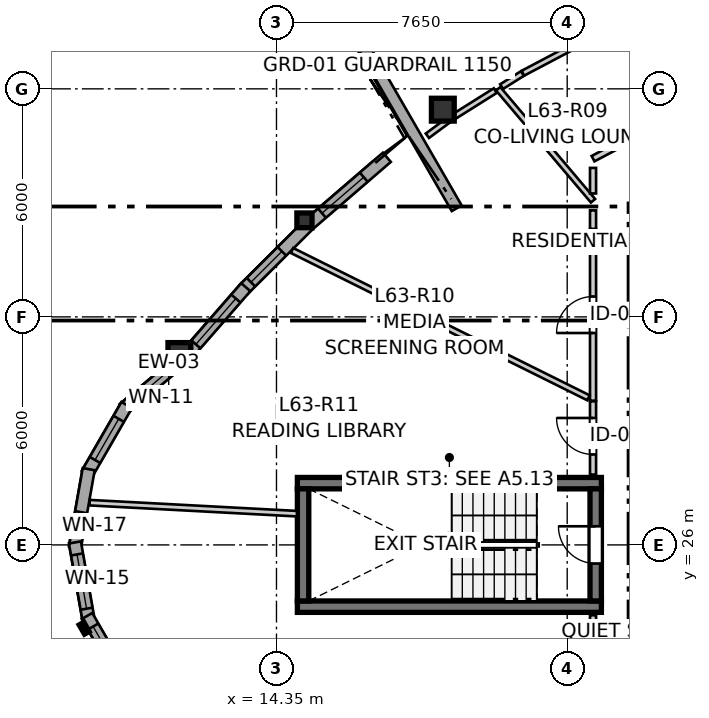
"""IFC4 building model, lengths in metres.
Left out: names, types, materials, properties, quantities, classifications, styles, units other than length and angle.
Written with IfcOpenShell. Run it as: python <this file> out.ifc"""

import sys

from ifc_helpers import new_model, si_unit, direction, frame, frame_2d, origin, origin_2d, place, context, subcontext, project, spatial, rectangle, i_section, extrude, source, transform, mapped, element, fill, save


model = new_model("IFC4")
c1 = context("Model", 3, precision=1e-05, world=origin(), true_north=direction((0.0, 1.0)))
c2 = subcontext(c1, "Body", "Model", "MODEL_VIEW")
j1 = project(units=[si_unit("LENGTHUNIT", "METRE"), si_unit("PLANEANGLEUNIT", "RADIAN")], contexts=[c1])
p1 = place(None, origin())
s1 = spatial("IfcSite", under=j1, at=p1, CompositionType="ELEMENT")
p2 = place(p1, origin())
s2 = spatial("IfcBuilding", under=s1, at=p2, CompositionType="ELEMENT")
p3 = place(p2, frame((0.0, 0.0, 211.6)))
s3 = spatial("IfcBuildingStorey", under=s2, at=p3, CompositionType="ELEMENT", Elevation=211.6)
for number, where, z_axis, x_axis in (
    (1, (14.9, 24.375, 0.0), (0.0, 0.0, 1.0), (1.0, 0.0, 0.0)),
    (2, (22.9, 27.625, 0.0), (0.0, 0.0, 1.0), (-1.0, 0.0, 0.0)),
):
    element("IfcWall", number, at=place(p3, frame(where, z_axis=z_axis, x_axis=x_axis)), inside=s3, PredefinedType="SHEAR", context=c2, shape_type="SweptSolid", body=[
        extrude(rectangle(XDim=8.0, YDim=0.3, at=frame_2d((4.0, 0.0))), origin(), (0.0, 0.0, 1.0), 2.96),
    ])
p4 = place(p3, frame((15.05, 27.475, 0.0), z_axis=(0.0, 0.0, 1.0), x_axis=(0.0, -1.0, 0.0)))
e3 = element("IfcWall", 3, at=p4, inside=s3, PredefinedType="SHEAR", context=c2, shape_type="SweptSolid", body=[
    extrude(rectangle(XDim=2.95, YDim=0.3, at=frame_2d((1.475, 0.0))), origin(), (0.0, 0.0, 1.0), 2.96),
])
p5 = place(p3, frame((22.75, 24.525, 0.0), z_axis=(0.0, 0.0, 1.0), x_axis=(0.0, 1.0, 0.0)))
e4 = element("IfcWall", 4, at=p5, inside=s3, PredefinedType="SHEAR", context=c2, shape_type="SweptSolid", body=[
    extrude(rectangle(XDim=2.95, YDim=0.3, at=frame_2d((1.475, 0.0))), origin(), (0.0, 0.0, 1.0), 2.96),
])
p6 = place(p5, frame((0.985, 0.0, 0.0)))
e5 = element("IfcOpeningElement", 5, at=p6, cuts=e4, PredefinedType="OPENING", context=c2, shape_type="SweptSolid", body=[
    extrude(rectangle(XDim=0.98, YDim=2.15, at=frame_2d((0.49, 1.075))), frame((0.0, 0.16, 0.0), z_axis=(0.0, -1.0, 0.0), x_axis=(1.0, 0.0, 0.0)), (0.0, 0.0, 1.0), 0.32),
])
m1 = source(origin(), c2, "Body", "SweptSolid", [
    extrude(rectangle(XDim=0.6, YDim=0.6, at=origin_2d()), origin(), (0.0, 0.0, 1.0), 2.96),
])
for number, where, z_axis, x_axis in (
    (6, (11.795, 31.023, 0.0), (0.0, 0.0, 1.0), (1.0, 0.0, 0.0)),
    (7, (18.727, 37.452, 0.0), (0.0, 0.0, 1.0), (1.0, 0.0, 0.0)),
):
    element("IfcColumn", number, at=place(p3, frame(where, z_axis=z_axis, x_axis=x_axis)), inside=s3, PredefinedType="COLUMN", context=c2, shape_type="MappedRepresentation", body=[
        mapped(m1, transform((0.0, 0.0, 0.0), x_axis=(1.0, 0.0, 0.0), y_axis=(0.0, 1.0, 0.0), z_axis=(0.0, 0.0, 1.0), scale=1.0)),
    ])
m2 = source(origin(), c2, "Body", "SweptSolid", [
    extrude(i_section(OverallWidth=0.398, OverallDepth=0.387, WebThickness=0.019, FlangeThickness=0.03, FilletRadius=0.015, at=origin_2d()), origin(), (0.0, 0.0, 1.0), 2.96),
])
p7 = place(p3, frame((15.086, 34.541, 0.0), z_axis=(0.0, 0.0, 1.0), x_axis=(1.0, 0.0, 0.0)))
e8 = element("IfcColumn", 8, at=p7, inside=s3, PredefinedType="PILASTER", context=c2, shape_type="MappedRepresentation", body=[
    mapped(m2, transform((0.0, 0.0, 0.0), x_axis=(1.0, 0.0, 0.0), y_axis=(0.0, 1.0, 0.0), z_axis=(0.0, 0.0, 1.0), scale=1.0)),
])
p8 = place(p3, frame((11.829, 30.843, 0.0), z_axis=(0.0, 0.0, 1.0), x_axis=(-0.76606505432, -0.642763045414, 0.0)))
e9 = element("IfcWall", 9, at=p8, inside=s3, PredefinedType="SOLIDWALL", context=c2, shape_type="SweptSolid", body=[
    extrude(rectangle(XDim=1.962, YDim=0.32, at=frame_2d((0.981, 0.0))), origin(), (0.0, 0.0, 1.0), 2.58),
])
p9 = place(p8, frame((0.391, 0.0, 0.82)))
e10 = element("IfcOpeningElement", 10, at=p9, cuts=e9, PredefinedType="OPENING", context=c2, shape_type="SweptSolid", body=[
    extrude(rectangle(XDim=1.25, YDim=1.35, at=frame_2d((0.625, 0.675))), frame((0.0, 0.17, 0.0), z_axis=(0.0, -1.0, 0.0), x_axis=(1.0, 0.0, 0.0)), (0.0, 0.0, 1.0), 0.34),
])
p10 = place(p3, frame((10.409, 29.681, 0.0), z_axis=(0.0, 0.0, 1.0), x_axis=(-0.49990781971, -0.866078617559, 0.0)))
e11 = element("IfcWall", 11, at=p10, inside=s3, PredefinedType="SOLIDWALL", context=c2, shape_type="SweptSolid", body=[
    extrude(rectangle(XDim=2.09, YDim=0.32, at=frame_2d((1.045, 0.0))), origin(), (0.0, 0.0, 1.0), 2.58),
])
p11 = place(p10, frame((0.42, 0.0, 0.82)))
e12 = element("IfcOpeningElement", 12, at=p11, cuts=e11, PredefinedType="OPENING", context=c2, shape_type="SweptSolid", body=[
    extrude(rectangle(XDim=1.25, YDim=1.35, at=frame_2d((0.625, 0.675))), frame((0.0, 0.17, 0.0), z_axis=(0.0, -1.0, 0.0), x_axis=(1.0, 0.0, 0.0)), (0.0, 0.0, 1.0), 0.34),
])
p12 = place(p3, frame((9.409, 27.993, 0.0), z_axis=(0.0, 0.0, 1.0), x_axis=(-0.173672066494, -0.984803540469, 0.0)))
e13 = element("IfcWall", 13, at=p12, inside=s3, PredefinedType="SOLIDWALL", context=c2, shape_type="SweptSolid", body=[
    extrude(rectangle(XDim=2.09, YDim=0.32, at=frame_2d((1.045, 0.0))), origin(), (0.0, 0.0, 1.0), 2.58),
])
p13 = place(p12, frame((1.149, 0.0, 0.82)))
e14 = element("IfcOpeningElement", 14, at=p13, cuts=e13, PredefinedType="OPENING", context=c2, shape_type="SweptSolid", body=[
    extrude(rectangle(XDim=0.58, YDim=1.35, at=frame_2d((0.29, 0.675))), frame((0.0, 0.17, 0.0), z_axis=(0.0, -1.0, 0.0), x_axis=(1.0, 0.0, 0.0)), (0.0, 0.0, 1.0), 0.34),
])
p14 = place(p3, frame((9.046, 26.065, 0.0), z_axis=(0.0, 0.0, 1.0), x_axis=(0.173672066494, -0.984803540469, 0.0)))
e15 = element("IfcWall", 15, at=p14, inside=s3, PredefinedType="SOLIDWALL", context=c2, shape_type="SweptSolid", body=[
    extrude(rectangle(XDim=2.09, YDim=0.32, at=frame_2d((1.045, 0.0))), origin(), (0.0, 0.0, 1.0), 2.58),
])
p15 = place(p14, frame((0.32, 0.0, 0.82)))
e16 = element("IfcOpeningElement", 16, at=p15, cuts=e15, PredefinedType="OPENING", context=c2, shape_type="SweptSolid", body=[
    extrude(rectangle(XDim=1.45, YDim=1.25, at=frame_2d((0.725, 0.625))), frame((0.0, 0.17, 0.0), z_axis=(0.0, -1.0, 0.0), x_axis=(1.0, 0.0, 0.0)), (0.0, 0.0, 1.0), 0.34),
])
p16 = place(p3, frame((9.365, 24.129, 0.0), z_axis=(0.0, 0.0, 1.0), x_axis=(0.49990781971, -0.866078617559, 0.0)))
e17 = element("IfcWall", 17, at=p16, inside=s3, PredefinedType="SOLIDWALL", context=c2, shape_type="SweptSolid", body=[
    extrude(rectangle(XDim=2.09, YDim=0.32, at=frame_2d((1.045, 0.0))), origin(), (0.0, 0.0, 1.0), 2.58),
])
p17 = place(p16, frame((0.32, 0.0, 0.82)))
e18 = element("IfcOpeningElement", 18, at=p17, cuts=e17, PredefinedType="OPENING", context=c2, shape_type="SweptSolid", body=[
    extrude(rectangle(XDim=1.45, YDim=1.25, at=frame_2d((0.725, 0.625))), frame((0.0, 0.17, 0.0), z_axis=(0.0, -1.0, 0.0), x_axis=(1.0, 0.0, 0.0)), (0.0, 0.0, 1.0), 0.34),
])
p18 = place(p3, frame((17.255, 36.199, 0.0), z_axis=(0.0, 0.0, 1.0), x_axis=(-0.757502279287, -0.652832518242, 0.0)))
e19 = element("IfcWall", 19, at=p18, inside=s3, PredefinedType="SOLIDWALL", context=c2, shape_type="SweptSolid", body=[
    extrude(rectangle(XDim=2.706, YDim=0.32, at=frame_2d((1.353, 0.0))), origin(), (0.0, 0.0, 1.0), 2.58),
])
p19 = place(p18, frame((0.803, 0.0, 0.82)))
e20 = element("IfcOpeningElement", 20, at=p19, cuts=e19, PredefinedType="OPENING", context=c2, shape_type="SweptSolid", body=[
    extrude(rectangle(XDim=1.45, YDim=1.25, at=frame_2d((0.725, 0.625))), frame((0.0, 0.17, 0.0), z_axis=(0.0, -1.0, 0.0), x_axis=(1.0, 0.0, 0.0)), (0.0, 0.0, 1.0), 0.34),
])
p20 = place(p3, frame((15.185, 34.413, 0.0), z_axis=(0.0, 0.0, 1.0), x_axis=(-0.70842648029, -0.705784614471, 0.0)))
e21 = element("IfcWall", 21, at=p20, inside=s3, PredefinedType="SOLIDWALL", context=c2, shape_type="SweptSolid", body=[
    extrude(rectangle(XDim=2.403, YDim=0.32, at=frame_2d((1.201, 0.0))), origin(), (0.0, 0.0, 1.0), 2.58),
])
p21 = place(p20, frame((0.976, 0.0, 0.82)))
e22 = element("IfcOpeningElement", 22, at=p21, cuts=e21, PredefinedType="OPENING", context=c2, shape_type="SweptSolid", body=[
    extrude(rectangle(XDim=1.15, YDim=1.2, at=frame_2d((0.575, 0.6))), frame((0.0, 0.17, 0.0), z_axis=(0.0, -1.0, 0.0), x_axis=(1.0, 0.0, 0.0)), (0.0, 0.0, 1.0), 0.34),
])
p22 = place(p3, frame((13.542, 32.781, 0.0), z_axis=(0.0, 0.0, 1.0), x_axis=(-0.657706548736, -0.753274250024, 0.0)))
e23 = element("IfcWall", 23, at=p22, inside=s3, PredefinedType="SOLIDWALL", context=c2, shape_type="SweptSolid", body=[
    extrude(rectangle(XDim=2.384, YDim=0.32, at=frame_2d((1.192, 0.0))), origin(), (0.0, 0.0, 1.0), 2.58),
])
p23 = place(p22, frame((0.397, 0.0, 0.82)))
e24 = element("IfcOpeningElement", 24, at=p23, cuts=e23, PredefinedType="OPENING", context=c2, shape_type="SweptSolid", body=[
    extrude(rectangle(XDim=1.6, YDim=1.35, at=frame_2d((0.8, 0.675))), frame((0.0, 0.17, 0.0), z_axis=(0.0, -1.0, 0.0), x_axis=(1.0, 0.0, 0.0)), (0.0, 0.0, 1.0), 0.34),
])
p24 = place(p3, frame((19.093, 34.858, 0.0), z_axis=(0.0, 0.0, 1.0), x_axis=(-0.499994279776, 0.866028706332, 0.0)))
e25 = element("IfcWall", 25, at=p24, inside=s3, PredefinedType="SOLIDWALL", context=c2, shape_type="SweptSolid", body=[
    extrude(rectangle(XDim=19.929, YDim=0.3, at=frame_2d((9.964, 0.0))), origin(), (0.0, 0.0, 1.0), 2.14),
])
p25 = place(p3, frame((22.68, 19.52, 0.0), z_axis=(0.0, 0.0, 1.0), x_axis=(0.0, 1.0, 0.0)))
e26 = element("IfcWall", 26, at=p25, inside=s3, PredefinedType="PARTITIONING", context=c2, shape_type="SweptSolid", body=[
    extrude(rectangle(XDim=4.63, YDim=0.16, at=frame_2d((2.315, 0.0))), origin(), (0.0, 0.0, 1.0), 2.96),
])
p26 = place(p25, frame((1.357, 0.0, 0.0)))
e27 = element("IfcOpeningElement", 27, at=p26, cuts=e26, PredefinedType="OPENING", context=c2, shape_type="SweptSolid", body=[
    extrude(rectangle(XDim=1.3, YDim=2.1, at=frame_2d((0.65, 1.05))), frame((0.0, 0.09, 0.0), z_axis=(0.0, -1.0, 0.0), x_axis=(1.0, 0.0, 0.0)), (0.0, 0.0, 1.0), 0.18),
])
p27 = place(p3, frame((22.68, 29.794, 0.0), z_axis=(0.0, 0.0, 1.0), x_axis=(0.0, 1.0, 0.0)))
e28 = element("IfcWall", 28, at=p27, inside=s3, PredefinedType="PARTITIONING", context=c2, shape_type="SweptSolid", body=[
    extrude(rectangle(XDim=4.506, YDim=0.16, at=frame_2d((2.253, 0.0))), origin(), (0.0, 0.0, 1.0), 2.96),
])
p28 = place(p27, frame((1.781, 0.0, 0.0)))
e29 = element("IfcOpeningElement", 29, at=p28, cuts=e28, PredefinedType="OPENING", context=c2, shape_type="SweptSolid", body=[
    extrude(rectangle(XDim=0.96, YDim=2.1, at=frame_2d((0.48, 1.05))), frame((0.0, 0.09, 0.0), z_axis=(0.0, -1.0, 0.0), x_axis=(1.0, 0.0, 0.0)), (0.0, 0.0, 1.0), 0.18),
])
p29 = place(p3, frame((22.68, 27.85, 0.0), z_axis=(0.0, 0.0, 1.0), x_axis=(0.0, 1.0, 0.0)))
e30 = element("IfcWall", 30, at=p29, inside=s3, PredefinedType="PARTITIONING", context=c2, shape_type="SweptSolid", body=[
    extrude(rectangle(XDim=1.929, YDim=0.16, at=frame_2d((0.964, 0.0))), origin(), (0.0, 0.0, 1.0), 2.96),
])
p30 = place(p29, frame((0.53, 0.0, 0.0)))
e31 = element("IfcOpeningElement", 31, at=p30, cuts=e30, PredefinedType="OPENING", context=c2, shape_type="SweptSolid", body=[
    extrude(rectangle(XDim=0.96, YDim=2.1, at=frame_2d((0.48, 1.05))), frame((0.0, 0.09, 0.0), z_axis=(0.0, -1.0, 0.0), x_axis=(1.0, 0.0, 0.0)), (0.0, 0.0, 1.0), 0.18),
])
p31 = place(p3, frame((14.759, 33.747, 0.0), z_axis=(0.0, 0.0, 1.0), x_axis=(0.895550902793, -0.44495907734, 0.0)))
e32 = element("IfcWall", 32, at=p31, inside=s3, PredefinedType="PARTITIONING", context=c2, shape_type="SweptSolid", body=[
    extrude(rectangle(XDim=8.712, YDim=0.145, at=frame_2d((4.356, 0.0))), origin(), (0.0, 0.0, 1.0), 2.96),
])
p32 = place(p3, frame((9.433, 27.112, 0.0), z_axis=(0.0, 0.0, 1.0), x_axis=(0.998589537807, -0.053093643525, 0.0)))
e33 = element("IfcWall", 33, at=p32, inside=s3, PredefinedType="PARTITIONING", context=c2, shape_type="SweptSolid", body=[
    extrude(rectangle(XDim=5.463, YDim=0.145, at=frame_2d((2.731, 0.0))), origin(), (0.0, 0.0, 1.0), 2.96),
])
p33 = place(p3, frame((20.184, 38.002, 0.0), z_axis=(0.0, 0.0, 1.0), x_axis=(0.646276580378, -0.763103257531, 0.0)))
e34 = element("IfcWall", 34, at=p33, inside=s3, PredefinedType="PARTITIONING", context=c2, shape_type="SweptSolid", body=[
    extrude(rectangle(XDim=3.862, YDim=0.145, at=frame_2d((1.931, 0.0))), origin(), (0.0, 0.0, 1.0), 2.96),
])
p34 = place(p3, frame((20.834, 38.411, 0.0), z_axis=(0.0, 0.0, 1.0), x_axis=(0.884282286127, 0.466952715425, 0.0)))
e35 = element("IfcWall", 35, at=p34, inside=s3, PredefinedType="PARTITIONING", context=c2, shape_type="SweptSolid", body=[
    extrude(rectangle(XDim=2.268, YDim=0.145, at=frame_2d((1.134, 0.0))), origin(), (0.0, 0.0, 1.0), 2.568),
])
p35 = place(p3, frame((22.68, 36.163, 0.0), z_axis=(0.0, 0.0, 1.0), x_axis=(0.884428711586, 0.466675319812, 0.0)))
e36 = element("IfcWall", 36, at=p35, inside=s3, PredefinedType="PARTITIONING", context=c2, shape_type="SweptSolid", body=[
    extrude(rectangle(XDim=1.592, YDim=0.16, at=frame_2d((0.796, 0.0))), origin(), (0.0, 0.0, 1.0), 2.96),
])
p36 = place(p3, frame((18.902, 37.196, 0.0), z_axis=(0.0, 0.0, 1.0), x_axis=(0.846539334405, 0.532326173794, 0.0)))
e37 = element("IfcWall", 37, at=p36, inside=s3, PredefinedType="PARTITIONING", context=c2, shape_type="SweptSolid", body=[
    extrude(rectangle(XDim=1.423, YDim=0.145, at=frame_2d((0.711, 0.0))), origin(), (0.0, 0.0, 1.0), 2.568),
])
p37 = place(p3, frame((22.68, 35.247, 0.0), z_axis=(0.0, 0.0, 1.0), x_axis=(0.0, 1.0, 0.0)))
e38 = element("IfcWall", 38, at=p37, inside=s3, PredefinedType="PARTITIONING", context=c2, shape_type="SweptSolid", body=[
    extrude(rectangle(XDim=0.673, YDim=0.16, at=frame_2d((0.337, 0.0))), origin(), (0.0, 0.0, 1.0), 2.96),
])
p38 = place(p3, frame((20.274, 38.059, 0.0), z_axis=(0.0, 0.0, 1.0), x_axis=(0.84623284009, 0.532813269686, 0.0)))
e39 = element("IfcWall", 39, at=p38, inside=s3, PredefinedType="PARTITIONING", context=c2, shape_type="SweptSolid", body=[
    extrude(rectangle(XDim=0.646, YDim=0.145, at=frame_2d((0.323, 0.0))), origin(), (0.0, 0.0, 1.0), 2.568),
])
p39 = place(p3, frame((18.321, 36.766, 0.0), z_axis=(0.0, 0.0, 1.0), x_axis=(0.80387489201, 0.594798417951, 0.0)))
e40 = element("IfcWall", 40, at=p39, inside=s3, PredefinedType="PARTITIONING", context=c2, shape_type="SweptSolid", body=[
    extrude(rectangle(XDim=0.708, YDim=0.145, at=frame_2d((0.354, 0.0))), origin(), (0.0, 0.0, 1.0), 2.568),
])
p40 = place(p3, frame((22.68, 34.315, 0.0), z_axis=(0.0, 0.0, 1.0), x_axis=(0.0, 1.0, 0.0)))
e41 = element("IfcWall", 41, at=p40, inside=s3, PredefinedType="PARTITIONING", context=c2, shape_type="SweptSolid", body=[
    extrude(rectangle(XDim=0.488, YDim=0.16, at=frame_2d((0.244, 0.0))), origin(), (0.0, 0.0, 1.0), 2.96),
])
m3 = source(origin(), c2, "Body", "SweptSolid", [
    extrude(rectangle(XDim=1.25, YDim=1.35, at=frame_2d((0.625, 0.675))), frame((0.0, 0.03, 0.0), z_axis=(0.0, -1.0, 0.0), x_axis=(1.0, 0.0, 0.0)), (0.0, 0.0, 1.0), 0.06),
])
p41 = place(p9, origin())
e42 = element("IfcWindow", 42, at=p41, inside=s3, PartitioningType="SINGLE_PANEL", PredefinedType="WINDOW", context=c2, shape_type="MappedRepresentation", body=[
    mapped(m3, transform((0.0, 0.0, 0.0), x_axis=(1.0, 0.0, 0.0), y_axis=(0.0, 1.0, 0.0), z_axis=(0.0, 0.0, 1.0), scale=1.0)),
])
fill(e10, e42)
p42 = place(p11, origin())
e43 = element("IfcWindow", 43, at=p42, inside=s3, PartitioningType="SINGLE_PANEL", PredefinedType="WINDOW", context=c2, shape_type="MappedRepresentation", body=[
    mapped(m3, transform((0.0, 0.0, 0.0), x_axis=(1.0, 0.0, 0.0), y_axis=(0.0, 1.0, 0.0), z_axis=(0.0, 0.0, 1.0), scale=1.0)),
])
fill(e12, e43)
m4 = source(origin(), c2, "Body", "SweptSolid", [
    extrude(rectangle(XDim=0.58, YDim=1.35, at=frame_2d((0.29, 0.675))), frame((0.0, 0.03, 0.0), z_axis=(0.0, -1.0, 0.0), x_axis=(1.0, 0.0, 0.0)), (0.0, 0.0, 1.0), 0.06),
])
p43 = place(p13, origin())
e44 = element("IfcWindow", 44, at=p43, inside=s3, PartitioningType="SINGLE_PANEL", PredefinedType="WINDOW", context=c2, shape_type="MappedRepresentation", body=[
    mapped(m4, transform((0.0, 0.0, 0.0), x_axis=(1.0, 0.0, 0.0), y_axis=(0.0, 1.0, 0.0), z_axis=(0.0, 0.0, 1.0), scale=1.0)),
])
fill(e14, e44)
m5 = source(origin(), c2, "Body", "SweptSolid", [
    extrude(rectangle(XDim=1.45, YDim=1.25, at=frame_2d((0.725, 0.625))), frame((0.0, 0.03, 0.0), z_axis=(0.0, -1.0, 0.0), x_axis=(1.0, 0.0, 0.0)), (0.0, 0.0, 1.0), 0.06),
])
p44 = place(p15, origin())
e45 = element("IfcWindow", 45, at=p44, inside=s3, PartitioningType="SINGLE_PANEL", PredefinedType="WINDOW", context=c2, shape_type="MappedRepresentation", body=[
    mapped(m5, transform((0.0, 0.0, 0.0), x_axis=(1.0, 0.0, 0.0), y_axis=(0.0, 1.0, 0.0), z_axis=(0.0, 0.0, 1.0), scale=1.0)),
])
fill(e16, e45)
p45 = place(p17, origin())
e46 = element("IfcWindow", 46, at=p45, inside=s3, PartitioningType="SINGLE_PANEL", PredefinedType="WINDOW", context=c2, shape_type="MappedRepresentation", body=[
    mapped(m5, transform((0.0, 0.0, 0.0), x_axis=(1.0, 0.0, 0.0), y_axis=(0.0, 1.0, 0.0), z_axis=(0.0, 0.0, 1.0), scale=1.0)),
])
fill(e18, e46)
p46 = place(p19, origin())
e47 = element("IfcWindow", 47, at=p46, inside=s3, PartitioningType="SINGLE_PANEL", PredefinedType="WINDOW", context=c2, shape_type="MappedRepresentation", body=[
    mapped(m5, transform((0.0, 0.0, 0.0), x_axis=(1.0, 0.0, 0.0), y_axis=(0.0, 1.0, 0.0), z_axis=(0.0, 0.0, 1.0), scale=1.0)),
])
fill(e20, e47)
m6 = source(origin(), c2, "Body", "SweptSolid", [
    extrude(rectangle(XDim=1.15, YDim=1.2, at=frame_2d((0.575, 0.6))), frame((0.0, 0.03, 0.0), z_axis=(0.0, -1.0, 0.0), x_axis=(1.0, 0.0, 0.0)), (0.0, 0.0, 1.0), 0.06),
])
p47 = place(p21, origin())
e48 = element("IfcWindow", 48, at=p47, inside=s3, PartitioningType="SINGLE_PANEL", PredefinedType="WINDOW", context=c2, shape_type="MappedRepresentation", body=[
    mapped(m6, transform((0.0, 0.0, 0.0), x_axis=(1.0, 0.0, 0.0), y_axis=(0.0, 1.0, 0.0), z_axis=(0.0, 0.0, 1.0), scale=1.0)),
])
fill(e22, e48)
m7 = source(origin(), c2, "Body", "SweptSolid", [
    extrude(rectangle(XDim=1.6, YDim=1.35, at=frame_2d((0.8, 0.675))), frame((0.0, 0.03, 0.0), z_axis=(0.0, -1.0, 0.0), x_axis=(1.0, 0.0, 0.0)), (0.0, 0.0, 1.0), 0.06),
])
p48 = place(p23, origin())
e49 = element("IfcWindow", 49, at=p48, inside=s3, PartitioningType="SINGLE_PANEL", PredefinedType="WINDOW", context=c2, shape_type="MappedRepresentation", body=[
    mapped(m7, transform((0.0, 0.0, 0.0), x_axis=(1.0, 0.0, 0.0), y_axis=(0.0, 1.0, 0.0), z_axis=(0.0, 0.0, 1.0), scale=1.0)),
])
fill(e24, e49)
m8 = source(origin(), c2, "Body", "SweptSolid", [
    extrude(rectangle(XDim=0.98, YDim=2.15, at=frame_2d((0.49, 1.075))), frame((0.0, 0.025, 0.0), z_axis=(0.0, -1.0, 0.0), x_axis=(1.0, 0.0, 0.0)), (0.0, 0.0, 1.0), 0.05),
])
p49 = place(p6, origin())
e50 = element("IfcDoor", 50, at=p49, inside=s3, OperationType="SINGLE_SWING_RIGHT", PredefinedType="DOOR", context=c2, shape_type="MappedRepresentation", body=[
    mapped(m8, transform((0.0, 0.0, 0.0), x_axis=(1.0, 0.0, 0.0), y_axis=(0.0, 1.0, 0.0), z_axis=(0.0, 0.0, 1.0), scale=1.0)),
])
fill(e5, e50)
m9 = source(origin(), c2, "Body", "SweptSolid", [
    extrude(rectangle(XDim=0.96, YDim=2.1, at=frame_2d((0.48, 1.05))), frame((0.0, 0.025, 0.0), z_axis=(0.0, -1.0, 0.0), x_axis=(1.0, 0.0, 0.0)), (0.0, 0.0, 1.0), 0.05),
])
p50 = place(p28, origin())
e51 = element("IfcDoor", 51, at=p50, inside=s3, OperationType="SINGLE_SWING_LEFT", PredefinedType="DOOR", context=c2, shape_type="MappedRepresentation", body=[
    mapped(m9, transform((0.0, 0.0, 0.0), x_axis=(1.0, 0.0, 0.0), y_axis=(0.0, 1.0, 0.0), z_axis=(0.0, 0.0, 1.0), scale=1.0)),
])
fill(e29, e51)
p51 = place(p30, origin())
e52 = element("IfcDoor", 52, at=p51, inside=s3, OperationType="SINGLE_SWING_RIGHT", PredefinedType="DOOR", context=c2, shape_type="MappedRepresentation", body=[
    mapped(m9, transform((0.0, 0.0, 0.0), x_axis=(1.0, 0.0, 0.0), y_axis=(0.0, 1.0, 0.0), z_axis=(0.0, 0.0, 1.0), scale=1.0)),
])
fill(e31, e52)
save(model, sys.argv[1])
